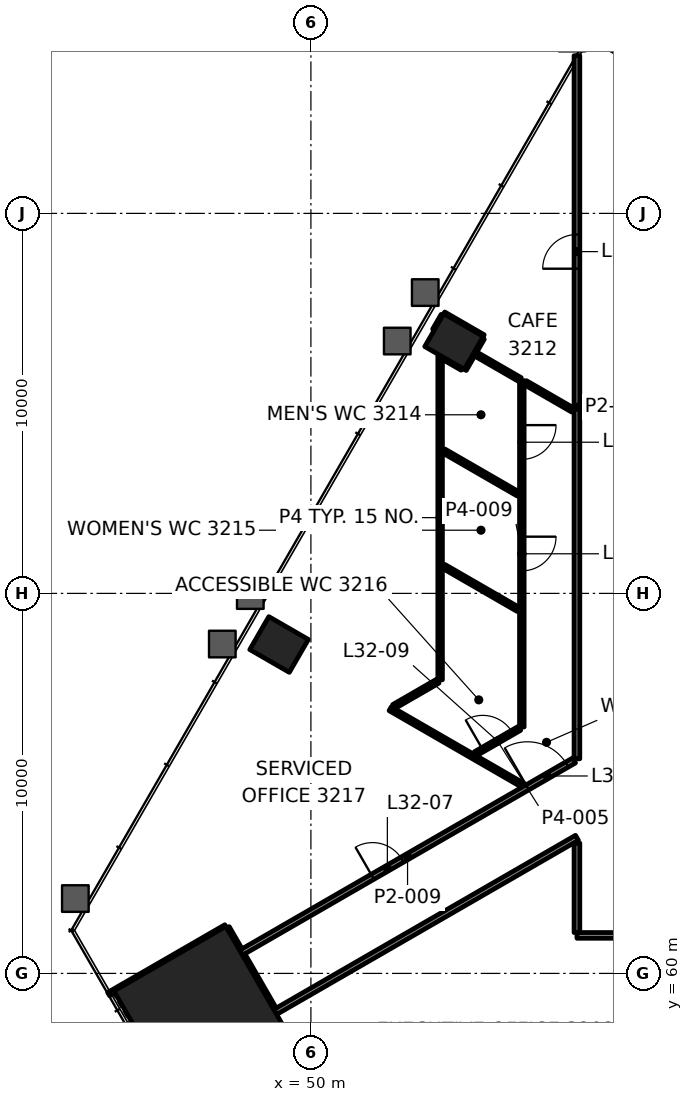
"""IFC4 building model, lengths in metres.
Left out: names, types, materials, properties, quantities, classifications, styles, units other than length and angle.
Written with IfcOpenShell. Run it as: python <this file> out.ifc"""

import sys

from ifc_helpers import new_model, si_unit, direction, frame, frame_2d, origin, origin_2d, place, context, subcontext, project, spatial, rectangle, extrude, element, fill, save


model = new_model("IFC4")
c1 = context("Model", 3, precision=1e-05, world=origin(), true_north=direction((0.0, 1.0)))
c2 = subcontext(c1, "Body", "Model", "MODEL_VIEW")
j1 = project(units=[si_unit("LENGTHUNIT", "METRE"), si_unit("PLANEANGLEUNIT", "RADIAN")], contexts=[c1])
p1 = place(None, origin())
s1 = spatial("IfcSite", under=j1, at=p1, CompositionType="ELEMENT")
p2 = place(p1, origin())
s2 = spatial("IfcBuilding", under=s1, at=p2, CompositionType="ELEMENT")
p3 = place(p2, frame((0.0, 0.0, 140.8)))
s3 = spatial("IfcBuildingStorey", under=s2, at=p3, CompositionType="ELEMENT", Elevation=140.8)
p4 = place(p3, frame((47.139, 58.914, 0.0), z_axis=(0.0, 0.0, 1.0), x_axis=(0.5, -0.866025403784, 0.0)))
e1 = element("IfcColumn", 1, at=p4, inside=s3, PredefinedType="COLUMN", context=c2, shape_type="SweptSolid", body=[
    extrude(rectangle(XDim=3.4, YDim=3.4, at=origin_2d()), origin(), (0.0, 0.0, 1.0), 6.0),
])
for number, where, z_axis, x_axis in (
    (2, (58.369, 84.602, -0.0), (0.0, 0.0, 1.0), (-0.5, -0.866, 0.0)),
    (3, (53.766, 76.628, -0.0), (0.0, 0.0, 1.0), (-0.5, -0.866, 0.0)),
    (4, (49.163, 68.655, -0.0), (0.0, 0.0, 1.0), (-0.5, -0.866, 0.0)),
):
    element("IfcColumn", number, at=place(p3, frame(where, z_axis=z_axis, x_axis=x_axis)), inside=s3, PredefinedType="COLUMN", context=c2, shape_type="SweptSolid", body=[
        extrude(rectangle(XDim=1.0, YDim=1.2, at=origin_2d()), origin(), (0.0, 0.0, 1.0), 6.0),
    ])
p5 = place(p3, frame((93.0, 61.0, 0.0), z_axis=(0.0, 0.0, 1.0), x_axis=(-1.0, 0.0, 0.0)))
e5 = element("IfcWall", 5, at=p5, inside=s3, PredefinedType="PARTITIONING", context=c2, shape_type="SweptSolid", body=[
    extrude(rectangle(XDim=35.999, YDim=0.15, at=frame_2d((18.0, 0.0))), origin(), (0.0, 0.0, 1.0), 4.95),
])
p6 = place(p5, frame((4.048, 0.0, 0.0)))
e6 = element("IfcOpeningElement", 6, at=p6, cuts=e5, PredefinedType="OPENING", context=c2, shape_type="SweptSolid", body=[
    extrude(rectangle(XDim=0.9, YDim=2.1, at=frame_2d((0.45, 1.05))), frame((0.0, 0.085, 0.0), z_axis=(0.0, -1.0, 0.0), x_axis=(1.0, 0.0, 0.0)), (0.0, 0.0, 1.0), 0.17),
])
p7 = place(p5, frame((17.55, 0.0, 0.0)))
e7 = element("IfcOpeningElement", 7, at=p7, cuts=e5, PredefinedType="OPENING", context=c2, shape_type="SweptSolid", body=[
    extrude(rectangle(XDim=0.9, YDim=2.1, at=frame_2d((0.45, 1.05))), frame((0.0, 0.085, 0.0), z_axis=(0.0, -1.0, 0.0), x_axis=(1.0, 0.0, 0.0)), (0.0, 0.0, 1.0), 0.17),
])
p8 = place(p5, frame((31.051, 0.0, 0.0)))
e8 = element("IfcOpeningElement", 8, at=p8, cuts=e5, PredefinedType="OPENING", context=c2, shape_type="SweptSolid", body=[
    extrude(rectangle(XDim=0.9, YDim=2.1, at=frame_2d((0.45, 1.05))), frame((0.0, 0.085, 0.0), z_axis=(0.0, -1.0, 0.0), x_axis=(1.0, 0.0, 0.0)), (0.0, 0.0, 1.0), 0.17),
])
p9 = place(p3, frame((49.061, 58.985, 0.0), z_axis=(0.0, 0.0, 1.0), x_axis=(0.866021929094, 0.500006018292, 0.0)))
e9 = element("IfcWall", 9, at=p9, inside=s3, PredefinedType="PARTITIONING", context=c2, shape_type="SweptSolid", body=[
    extrude(rectangle(XDim=9.167, YDim=0.15, at=frame_2d((4.583, 0.0))), origin(), (0.0, 0.0, 1.0), 4.797),
])
p10 = place(p3, frame((48.161, 60.544, 0.0), z_axis=(0.0, 0.0, 1.0), x_axis=(0.866026893599, 0.499997419557, 0.0)))
e10 = element("IfcWall", 10, at=p10, inside=s3, PredefinedType="PARTITIONING", context=c2, shape_type="SweptSolid", body=[
    extrude(rectangle(XDim=10.12, YDim=0.15, at=frame_2d((5.06, 0.0))), origin(), (0.0, 0.0, 1.0), 4.95),
])
p11 = place(p10, frame((3.996, 0.0, 0.0)))
e11 = element("IfcOpeningElement", 11, at=p11, cuts=e10, PredefinedType="OPENING", context=c2, shape_type="SweptSolid", body=[
    extrude(rectangle(XDim=0.9, YDim=2.1, at=frame_2d((0.45, 1.05))), frame((0.0, 0.085, 0.0), z_axis=(0.0, -1.0, 0.0), x_axis=(1.0, 0.0, 0.0)), (0.0, 0.0, 1.0), 0.17),
])
p12 = place(p10, frame((8.703, 0.0, 0.0)))
e12 = element("IfcOpeningElement", 12, at=p12, cuts=e10, PredefinedType="OPENING", context=c2, shape_type="SweptSolid", body=[
    extrude(rectangle(XDim=1.2, YDim=2.1, at=frame_2d((0.6, 1.05))), frame((0.0, 0.085, 0.0), z_axis=(0.0, -1.0, 0.0), x_axis=(1.0, 0.0, 0.0)), (0.0, 0.0, 1.0), 0.17),
])
p13 = place(p3, frame((44.678, 59.457, 0.0), z_axis=(0.0, 0.0, 1.0), x_axis=(0.866031398331, 0.499989616998, 0.0)))
e13 = element("IfcWall", 13, at=p13, inside=s3, PredefinedType="PARTITIONING", context=c2, shape_type="SweptSolid", body=[
    extrude(rectangle(XDim=3.56, YDim=0.1, at=frame_2d((1.78, 0.0))), origin(), (0.0, 0.0, 1.0), 4.95),
])
p14 = place(p3, frame((54.331, 65.781, 0.0), z_axis=(0.0, 0.0, 1.0), x_axis=(0.866079256742, 0.499906712339, 0.0)))
e14 = element("IfcWall", 14, at=p14, inside=s3, PredefinedType="PARTITIONING", context=c2, shape_type="SweptSolid", body=[
    extrude(rectangle(XDim=1.338, YDim=0.12, at=frame_2d((0.669, 0.0))), origin(), (0.0, 0.0, 1.0), 4.95),
])
p15 = place(p14, frame((0.219, 0.0, 0.0)))
e15 = element("IfcOpeningElement", 15, at=p15, cuts=e14, PredefinedType="OPENING", context=c2, shape_type="SweptSolid", body=[
    extrude(rectangle(XDim=0.9, YDim=2.1, at=frame_2d((0.45, 1.05))), frame((0.0, 0.07, 0.0), z_axis=(0.0, -1.0, 0.0), x_axis=(1.0, 0.0, 0.0)), (0.0, 0.0, 1.0), 0.14),
])
p16 = place(p3, frame((52.182, 67.022, 0.0), z_axis=(0.0, 0.0, 1.0), x_axis=(0.86600919026, 0.500028081597, 0.0)))
e16 = element("IfcWall", 16, at=p16, inside=s3, PredefinedType="PARTITIONING", context=c2, shape_type="SweptSolid", body=[
    extrude(rectangle(XDim=1.337, YDim=0.12, at=frame_2d((0.668, 0.0))), origin(), (0.0, 0.0, 1.0), 4.95),
])
p17 = place(p3, frame((54.035, 75.896, 0.0), z_axis=(0.0, 0.0, 1.0), x_axis=(0.499962889934, 0.866046828231, 0.0)))
e17 = element("IfcWall", 17, at=p17, inside=s3, PredefinedType="PARTITIONING", context=c2, shape_type="SweptSolid", body=[
    extrude(rectangle(XDim=0.439, YDim=0.12, at=frame_2d((0.22, 0.0))), origin(), (0.0, 0.0, 1.0), 4.95),
])
p18 = place(p3, frame((53.246, 76.929, 0.0), z_axis=(0.0, 0.0, 1.0), x_axis=(0.500114568548, 0.865959247497, 0.0)))
e18 = element("IfcWall", 18, at=p18, inside=s3, PredefinedType="PARTITIONING", context=c2, shape_type="SweptSolid", body=[
    extrude(rectangle(XDim=0.449, YDim=0.1, at=frame_2d((0.225, 0.0))), origin(), (0.0, 0.0, 1.0), 4.95),
])
p19 = place(p3, frame((57.0, 61.075, 0.0), z_axis=(0.0, 0.0, 1.0), x_axis=(0.0, 1.0, 0.0)))
e19 = element("IfcWall", 19, at=p19, inside=s3, PredefinedType="PARTITIONING", context=c2, shape_type="SweptSolid", body=[
    extrude(rectangle(XDim=2.356, YDim=0.15, at=frame_2d((1.178, 0.0))), origin(), (0.0, 0.0, 1.0), 4.95),
])
p20 = place(p3, frame((57.0, 65.647, 0.0), z_axis=(0.0, 0.0, 1.0), x_axis=(0.0, 1.0, 0.0)))
e20 = element("IfcWall", 20, at=p20, inside=s3, PredefinedType="PARTITIONING", context=c2, shape_type="SweptSolid", body=[
    extrude(rectangle(XDim=18.503, YDim=0.15, at=frame_2d((9.251, 0.0))), origin(), (0.0, 0.0, 1.0), 4.715),
])
p21 = place(p20, frame((12.897, 0.0, 0.0)))
e21 = element("IfcOpeningElement", 21, at=p21, cuts=e20, PredefinedType="OPENING", context=c2, shape_type="SweptSolid", body=[
    extrude(rectangle(XDim=0.9, YDim=2.1, at=frame_2d((0.45, 1.05))), frame((0.0, 0.085, 0.0), z_axis=(0.0, -1.0, 0.0), x_axis=(1.0, 0.0, 0.0)), (0.0, 0.0, 1.0), 0.17),
])
p22 = place(p3, frame((55.55, 75.598, 0.0), z_axis=(0.0, 0.0, 1.0), x_axis=(0.0, -1.0, 0.0)))
e22 = element("IfcWall", 22, at=p22, inside=s3, PredefinedType="PARTITIONING", context=c2, shape_type="SweptSolid", body=[
    extrude(rectangle(XDim=9.114, YDim=0.12, at=frame_2d((4.557, 0.0))), origin(), (0.0, 0.0, 1.0), 4.95),
])
p23 = place(p22, frame((1.17, 0.0, 0.0)))
e23 = element("IfcOpeningElement", 23, at=p23, cuts=e22, PredefinedType="OPENING", context=c2, shape_type="SweptSolid", body=[
    extrude(rectangle(XDim=0.9, YDim=2.1, at=frame_2d((0.45, 1.05))), frame((0.0, 0.07, 0.0), z_axis=(0.0, -1.0, 0.0), x_axis=(1.0, 0.0, 0.0)), (0.0, 0.0, 1.0), 0.14),
])
p24 = place(p22, frame((4.106, 0.0, 0.0)))
e24 = element("IfcOpeningElement", 24, at=p24, cuts=e22, PredefinedType="OPENING", context=c2, shape_type="SweptSolid", body=[
    extrude(rectangle(XDim=0.9, YDim=2.1, at=frame_2d((0.45, 1.05))), frame((0.0, 0.07, 0.0), z_axis=(0.0, -1.0, 0.0), x_axis=(1.0, 0.0, 0.0)), (0.0, 0.0, 1.0), 0.14),
])
p25 = place(p3, frame((53.4, 67.726, 0.0), z_axis=(0.0, 0.0, 1.0), x_axis=(0.0, 1.0, 0.0)))
e25 = element("IfcWall", 25, at=p25, inside=s3, PredefinedType="PARTITIONING", context=c2, shape_type="SweptSolid", body=[
    extrude(rectangle(XDim=8.536, YDim=0.12, at=frame_2d((4.268, 0.0))), origin(), (0.0, 0.0, 1.0), 4.715),
])
p26 = place(p3, frame((49.023, 59.05, 0.0), z_axis=(0.0, 0.0, 1.0), x_axis=(-0.499991515992, 0.866030301974, 0.0)))
e26 = element("IfcWall", 26, at=p26, inside=s3, PredefinedType="PARTITIONING", context=c2, shape_type="SweptSolid", body=[
    extrude(rectangle(XDim=1.649, YDim=0.15, at=frame_2d((0.825, 0.0))), origin(), (0.0, 0.0, 1.0), 4.797),
])
p27 = place(p3, frame((54.535, 76.761, 0.0), z_axis=(0.0, 0.0, 1.0), x_axis=(-0.866029639064, 0.499992664208, 0.0)))
e27 = element("IfcWall", 27, at=p27, inside=s3, PredefinedType="PARTITIONING", context=c2, shape_type="SweptSolid", body=[
    extrude(rectangle(XDim=1.199, YDim=0.1, at=frame_2d((0.6, 0.0))), origin(), (0.0, 0.0, 1.0), 4.715),
])
p28 = place(p3, frame((56.89, 74.824, 0.0), z_axis=(0.0, 0.0, 1.0), x_axis=(-0.866039173598, 0.499976149225, 0.0)))
e28 = element("IfcWall", 28, at=p28, inside=s3, PredefinedType="PARTITIONING", context=c2, shape_type="SweptSolid", body=[
    extrude(rectangle(XDim=1.444, YDim=0.12, at=frame_2d((0.722, 0.0))), origin(), (0.0, 0.0, 1.0), 4.95),
])
p29 = place(p3, frame((53.983, 75.926, 0.0), z_axis=(0.0, 0.0, 1.0), x_axis=(-0.865940158947, 0.500147619332, 0.0)))
e29 = element("IfcWall", 29, at=p29, inside=s3, PredefinedType="PARTITIONING", context=c2, shape_type="SweptSolid", body=[
    extrude(rectangle(XDim=0.563, YDim=0.12, at=frame_2d((0.282, 0.0))), origin(), (0.0, 0.0, 1.0), 4.715),
])
p30 = place(p3, frame((55.456, 72.616, 0.0), z_axis=(0.0, 0.0, 1.0), x_axis=(-0.866011396007, 0.500024261398, 0.0)))
e30 = element("IfcWall", 30, at=p30, inside=s3, PredefinedType="PARTITIONING", context=c2, shape_type="SweptSolid", body=[
    extrude(rectangle(XDim=2.264, YDim=0.12, at=frame_2d((1.132, 0.0))), origin(), (0.0, 0.0, 1.0), 4.95),
])
p31 = place(p3, frame((55.455, 69.578, 0.0), z_axis=(0.0, 0.0, 1.0), x_axis=(-0.866058089564, 0.499943382296, 0.0)))
e31 = element("IfcWall", 31, at=p31, inside=s3, PredefinedType="PARTITIONING", context=c2, shape_type="SweptSolid", body=[
    extrude(rectangle(XDim=2.264, YDim=0.12, at=frame_2d((1.132, 0.0))), origin(), (0.0, 0.0, 1.0), 4.95),
])
p32 = place(p3, frame((55.577, 64.951, 0.0), z_axis=(0.0, 0.0, 1.0), x_axis=(-0.866000935103, 0.500042378605, 0.0)))
e32 = element("IfcWall", 32, at=p32, inside=s3, PredefinedType="PARTITIONING", context=c2, shape_type="SweptSolid", body=[
    extrude(rectangle(XDim=4.03, YDim=0.12, at=frame_2d((2.015, 0.0))), origin(), (0.0, 0.0, 1.0), 4.95),
])
p33 = place(p3, frame((48.123, 60.608, 0.0), z_axis=(0.0, 0.0, 1.0), x_axis=(-0.499837337514, 0.866119296648, 0.0)))
e33 = element("IfcWall", 33, at=p33, inside=s3, PredefinedType="PARTITIONING", context=c2, shape_type="SweptSolid", body=[
    extrude(rectangle(XDim=0.675, YDim=0.15, at=frame_2d((0.337, 0.0))), origin(), (0.0, 0.0, 1.0), 4.95),
])
p34 = place(p3, frame((54.315, 76.381, 0.0), z_axis=(0.0, 0.0, 1.0), x_axis=(0.500047902311, 0.865997745606, 0.0)))
e34 = element("IfcWall", 34, at=p34, inside=s3, PredefinedType="PARTITIONING", context=c2, shape_type="SweptSolid", body=[
    extrude(rectangle(XDim=0.39, YDim=0.12, at=frame_2d((0.195, 0.0))), origin(), (0.0, 0.0, 1.0), 4.95),
])
p35 = place(p3, frame((55.505, 75.624, 0.0), z_axis=(0.0, 0.0, 1.0), x_axis=(-0.866015238154, 0.500017606974, 0.0)))
e35 = element("IfcWall", 35, at=p35, inside=s3, PredefinedType="PARTITIONING", context=c2, shape_type="SweptSolid", body=[
    extrude(rectangle(XDim=1.408, YDim=0.12, at=frame_2d((0.704, 0.0))), origin(), (0.0, 0.0, 1.0), 4.95),
])
p36 = place(p11, origin())
e36 = element("IfcDoor", 36, at=p36, inside=s3, OperationType="SINGLE_SWING_RIGHT", PredefinedType="DOOR", context=c2, shape_type="SweptSolid", body=[
    extrude(rectangle(XDim=0.9, YDim=2.1, at=frame_2d((0.45, 1.05))), frame((0.0, 0.025, 0.0), z_axis=(0.0, -1.0, 0.0), x_axis=(1.0, 0.0, 0.0)), (0.0, 0.0, 1.0), 0.05),
])
fill(e11, e36)
p37 = place(p12, origin())
e37 = element("IfcDoor", 37, at=p37, inside=s3, OperationType="DOUBLE_DOOR_SINGLE_SWING", PredefinedType="DOOR", context=c2, shape_type="SweptSolid", body=[
    extrude(rectangle(XDim=1.2, YDim=2.1, at=frame_2d((0.6, 1.05))), frame((0.0, 0.025, 0.0), z_axis=(0.0, -1.0, 0.0), x_axis=(1.0, 0.0, 0.0)), (0.0, 0.0, 1.0), 0.05),
])
fill(e12, e37)
p38 = place(p15, origin())
e38 = element("IfcDoor", 38, at=p38, inside=s3, OperationType="SINGLE_SWING_LEFT", PredefinedType="DOOR", context=c2, shape_type="SweptSolid", body=[
    extrude(rectangle(XDim=0.9, YDim=2.1, at=frame_2d((0.45, 1.05))), frame((0.0, 0.025, 0.0), z_axis=(0.0, -1.0, 0.0), x_axis=(1.0, 0.0, 0.0)), (0.0, 0.0, 1.0), 0.05),
])
fill(e15, e38)
p39 = place(p21, origin())
e39 = element("IfcDoor", 39, at=p39, inside=s3, OperationType="SINGLE_SWING_LEFT", PredefinedType="DOOR", context=c2, shape_type="SweptSolid", body=[
    extrude(rectangle(XDim=0.9, YDim=2.1, at=frame_2d((0.45, 1.05))), frame((0.0, 0.025, 0.0), z_axis=(0.0, -1.0, 0.0), x_axis=(1.0, 0.0, 0.0)), (0.0, 0.0, 1.0), 0.05),
])
fill(e21, e39)
p40 = place(p23, origin())
e40 = element("IfcDoor", 40, at=p40, inside=s3, OperationType="SINGLE_SWING_RIGHT", PredefinedType="DOOR", context=c2, shape_type="SweptSolid", body=[
    extrude(rectangle(XDim=0.9, YDim=2.1, at=frame_2d((0.45, 1.05))), frame((0.0, 0.025, 0.0), z_axis=(0.0, -1.0, 0.0), x_axis=(1.0, 0.0, 0.0)), (0.0, 0.0, 1.0), 0.05),
])
fill(e23, e40)
p41 = place(p24, origin())
e41 = element("IfcDoor", 41, at=p41, inside=s3, OperationType="SINGLE_SWING_LEFT", PredefinedType="DOOR", context=c2, shape_type="SweptSolid", body=[
    extrude(rectangle(XDim=0.9, YDim=2.1, at=frame_2d((0.45, 1.05))), frame((0.0, 0.025, 0.0), z_axis=(0.0, -1.0, 0.0), x_axis=(1.0, 0.0, 0.0)), (0.0, 0.0, 1.0), 0.05),
])
fill(e24, e41)
save(model, sys.argv[1])
